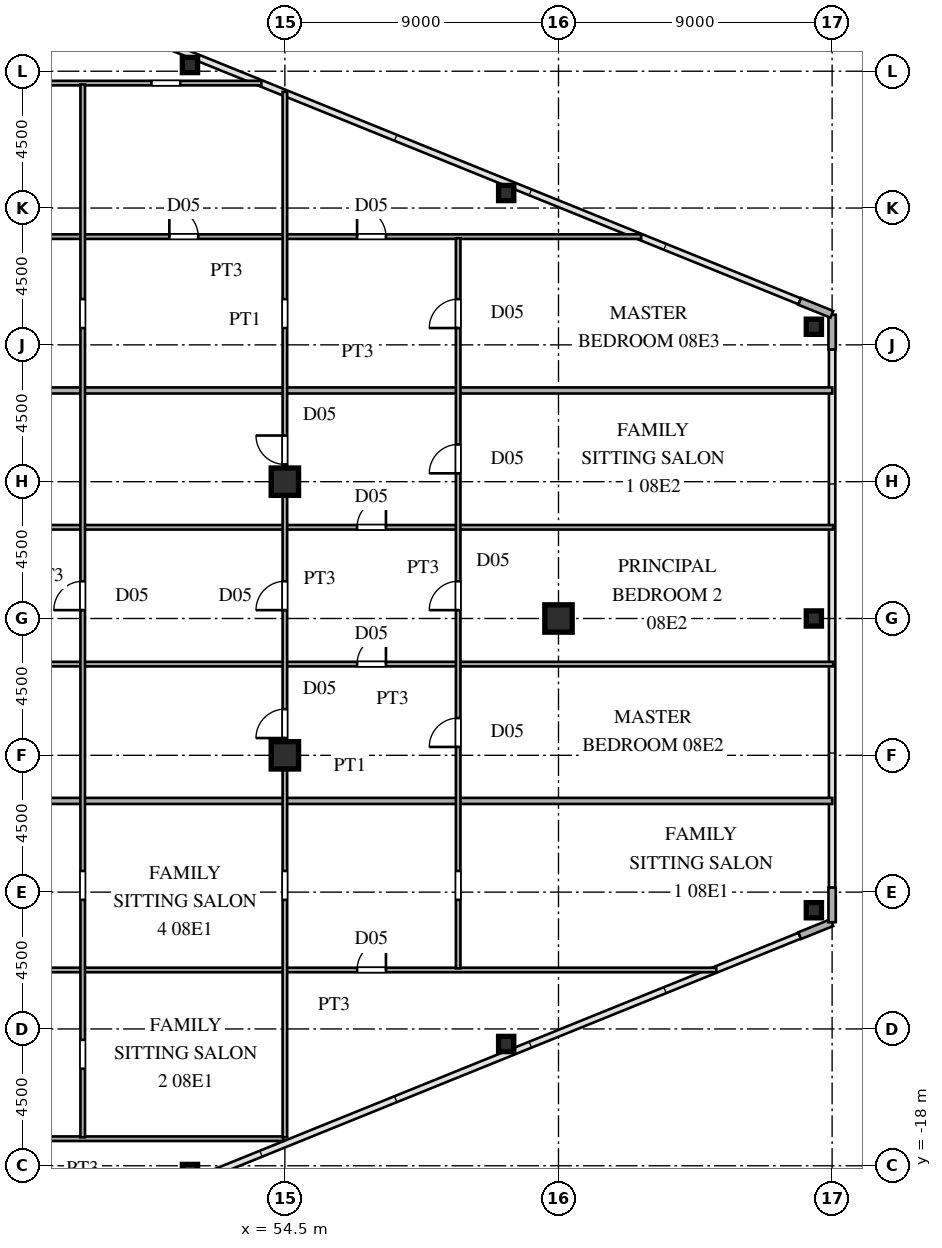
"""IFC4 building model, lengths in metres.
Left out: names, types, materials, properties, quantities, classifications, styles, units other than length and angle.
Written with IfcOpenShell. Run it as: python <this file> out.ifc"""

import sys

from ifc_helpers import new_model, si_unit, direction, frame, frame_2d, origin, origin_2d, place, context, subcontext, project, spatial, rectangle, hollow_rectangle, i_section, extrude, source, transform, mapped, element, fill, save


model = new_model("IFC4")
c1 = context("Model", 3, precision=1e-05, world=origin(), true_north=direction((0.0, 1.0)))
c2 = subcontext(c1, "Body", "Model", "MODEL_VIEW")
j1 = project(units=[si_unit("LENGTHUNIT", "METRE"), si_unit("PLANEANGLEUNIT", "RADIAN")], contexts=[c1])
p1 = place(None, origin())
s1 = spatial("IfcSite", under=j1, at=p1, CompositionType="ELEMENT")
p2 = place(p1, origin())
s2 = spatial("IfcBuilding", under=s1, at=p2, CompositionType="ELEMENT")
p3 = place(p2, frame((0.0, 0.0, 33.3)))
s3 = spatial("IfcBuildingStorey", under=s2, at=p3, CompositionType="ELEMENT", Elevation=33.3)
m1 = source(origin(), c2, "Body", "SweptSolid", [
    extrude(i_section(OverallWidth=0.9, OverallDepth=0.9, WebThickness=0.036, FlangeThickness=0.055, at=origin_2d()), origin(), (0.0, 0.0, 1.0), 3.6),
])
for number, where, z_axis, x_axis in (
    (1, (54.5, -4.5, 0.0), (0.0, 0.0, 1.0), (1.0, 0.0, 0.0)),
    (2, (54.5, 4.5, 0.0), (0.0, 0.0, 1.0), (1.0, 0.0, 0.0)),
    (3, (63.5, 0.0, 0.0), (0.0, 0.0, 1.0), (1.0, 0.0, 0.0)),
):
    element("IfcColumn", number, at=place(p3, frame(where, z_axis=z_axis, x_axis=x_axis)), inside=s3, PredefinedType="COLUMN", context=c2, shape_type="MappedRepresentation", body=[
        mapped(m1, transform((0.0, 0.0, 0.0), scale=1.0)),
    ])
m2 = source(origin(), c2, "Body", "SweptSolid", [
    extrude(hollow_rectangle(XDim=0.5, YDim=0.5, WallThickness=0.02, at=origin_2d()), origin(), (0.0, 0.0, 1.0), 3.6),
])
for number, where, z_axis, x_axis in (
    (4, (71.9, -9.596, 0.0), (0.0, 0.0, 1.0), (1.0, 0.0, 0.0)),
    (5, (71.9, 9.596, 0.0), (0.0, 0.0, 1.0), (1.0, 0.0, 0.0)),
    (6, (51.378, -18.204, 0.0), (0.0, 0.0, 1.0), (1.0, 0.0, 0.0)),
    (7, (61.779, -13.994, 0.0), (0.0, 0.0, 1.0), (1.0, 0.0, 0.0)),
    (8, (51.378, 18.204, 0.0), (0.0, 0.0, 1.0), (1.0, 0.0, 0.0)),
    (9, (61.779, 13.994, 0.0), (0.0, 0.0, 1.0), (1.0, 0.0, 0.0)),
    (10, (71.9, 0.0, 0.0), (0.0, 0.0, 1.0), (1.0, 0.0, 0.0)),
):
    element("IfcColumn", number, at=place(p3, frame(where, z_axis=z_axis, x_axis=x_axis)), inside=s3, PredefinedType="COLUMN", context=c2, shape_type="MappedRepresentation", body=[
        mapped(m2, transform((0.0, 0.0, 0.0), scale=1.0)),
    ])
for number, where, z_axis, x_axis in (
    (11, (71.434, -10.431, 0.0), (0.0, 0.0, 1.0), (0.927, 0.375, 0.0)),
    (12, (72.5, -9.99, 0.0), (0.0, 0.0, 1.0), (0.0, 1.0, 0.0)),
    (13, (72.5, 8.85, 0.0), (0.0, 0.0, 1.0), (0.0, 1.0, 0.0)),
    (14, (72.491, 10.004, 0.0), (0.0, 0.0, 1.0), (-0.927, 0.375, 0.0)),
):
    element("IfcWall", number, at=place(p3, frame(where, z_axis=z_axis, x_axis=x_axis)), inside=s3, PredefinedType="SOLIDWALL", context=c2, shape_type="SweptSolid", body=[
        extrude(rectangle(XDim=1.14, YDim=0.24, at=frame_2d((0.57, 0.0))), origin(), (0.0, 0.0, 1.0), 3.38),
    ])
p4 = place(p3, frame((41.25, -17.11, 0.0), z_axis=(0.0, 0.0, 1.0), x_axis=(1.0, 0.0, 0.0)))
e15 = element("IfcWall", 15, at=p4, inside=s3, PredefinedType="PARTITIONING", context=c2, shape_type="SweptSolid", body=[
    extrude(rectangle(XDim=13.2, YDim=0.15, at=frame_2d((6.6, 0.0))), origin(), (0.0, 0.0, 1.0), 3.38),
])
p5 = place(p4, frame((2.8, 0.0, 0.0)))
e16 = element("IfcOpeningElement", 16, at=p5, cuts=e15, PredefinedType="OPENING", context=c2, shape_type="SweptSolid", body=[
    extrude(rectangle(XDim=0.95, YDim=2.15, at=frame_2d((0.475, 1.075))), frame((0.0, 0.085, 0.0), z_axis=(0.0, -1.0, 0.0), x_axis=(1.0, 0.0, 0.0)), (0.0, 0.0, 1.0), 0.17),
])
p6 = place(p3, frame((41.25, -11.56, 0.0), z_axis=(0.0, 0.0, 1.0), x_axis=(1.0, 0.0, 0.0)))
e17 = element("IfcWall", 17, at=p6, inside=s3, PredefinedType="PARTITIONING", context=c2, shape_type="SweptSolid", body=[
    extrude(rectangle(XDim=27.44, YDim=0.15, at=frame_2d((13.72, 0.0))), origin(), (0.0, 0.0, 1.0), 3.38),
])
p7 = place(p6, frame((2.8, 0.0, 0.0)))
e18 = element("IfcOpeningElement", 18, at=p7, cuts=e17, PredefinedType="OPENING", context=c2, shape_type="SweptSolid", body=[
    extrude(rectangle(XDim=0.95, YDim=2.15, at=frame_2d((0.475, 1.075))), frame((0.0, 0.085, 0.0), z_axis=(0.0, -1.0, 0.0), x_axis=(1.0, 0.0, 0.0)), (0.0, 0.0, 1.0), 0.17),
])
p8 = place(p6, frame((15.625, 0.0, 0.0)))
e19 = element("IfcOpeningElement", 19, at=p8, cuts=e17, PredefinedType="OPENING", context=c2, shape_type="SweptSolid", body=[
    extrude(rectangle(XDim=0.95, YDim=2.15, at=frame_2d((0.475, 1.075))), frame((0.0, 0.085, 0.0), z_axis=(0.0, -1.0, 0.0), x_axis=(1.0, 0.0, 0.0)), (0.0, 0.0, 1.0), 0.17),
])
p9 = place(p3, frame((38.48, -6.0, 0.0), z_axis=(0.0, 0.0, 1.0), x_axis=(1.0, 0.0, 0.0)))
e20 = element("IfcWall", 20, at=p9, inside=s3, PredefinedType="PARTITIONING", context=c2, shape_type="SweptSolid", body=[
    extrude(rectangle(XDim=34.025, YDim=0.2, at=frame_2d((17.012, 0.0))), origin(), (0.0, 0.0, 1.0), 3.38),
])
p10 = place(p3, frame((41.25, -1.5, 0.0), z_axis=(0.0, 0.0, 1.0), x_axis=(1.0, 0.0, 0.0)))
e21 = element("IfcWall", 21, at=p10, inside=s3, PredefinedType="PARTITIONING", context=c2, shape_type="SweptSolid", body=[
    extrude(rectangle(XDim=31.285, YDim=0.15, at=frame_2d((15.643, 0.0))), origin(), (0.0, 0.0, 1.0), 3.38),
])
p11 = place(p10, frame((2.8, 0.0, 0.0)))
e22 = element("IfcOpeningElement", 22, at=p11, cuts=e21, PredefinedType="OPENING", context=c2, shape_type="SweptSolid", body=[
    extrude(rectangle(XDim=0.95, YDim=2.15, at=frame_2d((0.475, 1.075))), frame((0.0, 0.085, 0.0), z_axis=(0.0, -1.0, 0.0), x_axis=(1.0, 0.0, 0.0)), (0.0, 0.0, 1.0), 0.17),
])
p12 = place(p10, frame((15.625, 0.0, 0.0)))
e23 = element("IfcOpeningElement", 23, at=p12, cuts=e21, PredefinedType="OPENING", context=c2, shape_type="SweptSolid", body=[
    extrude(rectangle(XDim=0.95, YDim=2.15, at=frame_2d((0.475, 1.075))), frame((0.0, 0.085, 0.0), z_axis=(0.0, -1.0, 0.0), x_axis=(1.0, 0.0, 0.0)), (0.0, 0.0, 1.0), 0.17),
])
p13 = place(p3, frame((41.25, 3.0, 0.0), z_axis=(0.0, 0.0, 1.0), x_axis=(1.0, 0.0, 0.0)))
e24 = element("IfcWall", 24, at=p13, inside=s3, PredefinedType="PARTITIONING", context=c2, shape_type="SweptSolid", body=[
    extrude(rectangle(XDim=31.285, YDim=0.15, at=frame_2d((15.643, 0.0))), origin(), (0.0, 0.0, 1.0), 3.38),
])
p14 = place(p13, frame((2.8, 0.0, 0.0)))
e25 = element("IfcOpeningElement", 25, at=p14, cuts=e24, PredefinedType="OPENING", context=c2, shape_type="SweptSolid", body=[
    extrude(rectangle(XDim=0.95, YDim=2.15, at=frame_2d((0.475, 1.075))), frame((0.0, 0.085, 0.0), z_axis=(0.0, -1.0, 0.0), x_axis=(1.0, 0.0, 0.0)), (0.0, 0.0, 1.0), 0.17),
])
p15 = place(p13, frame((15.625, 0.0, 0.0)))
e26 = element("IfcOpeningElement", 26, at=p15, cuts=e24, PredefinedType="OPENING", context=c2, shape_type="SweptSolid", body=[
    extrude(rectangle(XDim=0.95, YDim=2.15, at=frame_2d((0.475, 1.075))), frame((0.0, 0.085, 0.0), z_axis=(0.0, -1.0, 0.0), x_axis=(1.0, 0.0, 0.0)), (0.0, 0.0, 1.0), 0.17),
])
p16 = place(p3, frame((38.48, 7.5, 0.0), z_axis=(0.0, 0.0, 1.0), x_axis=(1.0, 0.0, 0.0)))
e27 = element("IfcWall", 27, at=p16, inside=s3, PredefinedType="PARTITIONING", context=c2, shape_type="SweptSolid", body=[
    extrude(rectangle(XDim=34.025, YDim=0.2, at=frame_2d((17.012, 0.0))), origin(), (0.0, 0.0, 1.0), 3.38),
])
p17 = place(p3, frame((41.25, 12.56, 0.0), z_axis=(0.0, 0.0, 1.0), x_axis=(1.0, 0.0, 0.0)))
e28 = element("IfcWall", 28, at=p17, inside=s3, PredefinedType="PARTITIONING", context=c2, shape_type="SweptSolid", body=[
    extrude(rectangle(XDim=24.969, YDim=0.15, at=frame_2d((12.484, 0.0))), origin(), (0.0, 0.0, 1.0), 3.38),
])
p18 = place(p17, frame((2.8, 0.0, 0.0)))
e29 = element("IfcOpeningElement", 29, at=p18, cuts=e28, PredefinedType="OPENING", context=c2, shape_type="SweptSolid", body=[
    extrude(rectangle(XDim=0.95, YDim=2.15, at=frame_2d((0.475, 1.075))), frame((0.0, 0.085, 0.0), z_axis=(0.0, -1.0, 0.0), x_axis=(1.0, 0.0, 0.0)), (0.0, 0.0, 1.0), 0.17),
])
p19 = place(p17, frame((15.625, 0.0, 0.0)))
e30 = element("IfcOpeningElement", 30, at=p19, cuts=e28, PredefinedType="OPENING", context=c2, shape_type="SweptSolid", body=[
    extrude(rectangle(XDim=0.95, YDim=2.15, at=frame_2d((0.475, 1.075))), frame((0.0, 0.085, 0.0), z_axis=(0.0, -1.0, 0.0), x_axis=(1.0, 0.0, 0.0)), (0.0, 0.0, 1.0), 0.17),
])
p20 = place(p17, frame((9.45, 0.0, 0.0)))
e31 = element("IfcOpeningElement", 31, at=p20, cuts=e28, PredefinedType="OPENING", context=c2, shape_type="SweptSolid", body=[
    extrude(rectangle(XDim=0.95, YDim=2.15, at=frame_2d((0.475, 1.075))), frame((0.0, 0.085, 0.0), z_axis=(0.0, -1.0, 0.0), x_axis=(1.0, 0.0, 0.0)), (0.0, 0.0, 1.0), 0.17),
])
p21 = place(p3, frame((41.25, 17.61, 0.0), z_axis=(0.0, 0.0, 1.0), x_axis=(1.0, 0.0, 0.0)))
e32 = element("IfcWall", 32, at=p21, inside=s3, PredefinedType="PARTITIONING", context=c2, shape_type="SweptSolid", body=[
    extrude(rectangle(XDim=12.477, YDim=0.15, at=frame_2d((6.239, 0.0))), origin(), (0.0, 0.0, 1.0), 3.38),
])
p22 = place(p21, frame((8.86, 0.0, 0.0)))
e33 = element("IfcOpeningElement", 33, at=p22, cuts=e32, PredefinedType="OPENING", context=c2, shape_type="SweptSolid", body=[
    extrude(rectangle(XDim=0.95, YDim=2.15, at=frame_2d((0.475, 1.075))), frame((0.0, 0.085, 0.0), z_axis=(0.0, -1.0, 0.0), x_axis=(1.0, 0.0, 0.0)), (0.0, 0.0, 1.0), 0.17),
])
p23 = place(p3, frame((47.85, -17.063, 0.0), z_axis=(0.0, 0.0, 1.0), x_axis=(0.0, 1.0, 0.0)))
e34 = element("IfcWall", 34, at=p23, inside=s3, PredefinedType="PARTITIONING", context=c2, shape_type="SweptSolid", body=[
    extrude(rectangle(XDim=34.626, YDim=0.15, at=frame_2d((17.313, 0.0))), origin(), (0.0, 0.0, 1.0), 3.38),
])
p24 = place(p23, frame((7.81, 0.0, 0.0)))
e35 = element("IfcOpeningElement", 35, at=p24, cuts=e34, PredefinedType="OPENING", context=c2, shape_type="SweptSolid", body=[
    extrude(rectangle(XDim=0.95, YDim=2.15, at=frame_2d((0.475, 1.075))), frame((0.0, 0.085, 0.0), z_axis=(0.0, -1.0, 0.0), x_axis=(1.0, 0.0, 0.0)), (0.0, 0.0, 1.0), 0.17),
])
p25 = place(p23, frame((2.253, 0.0, 0.0)))
e36 = element("IfcOpeningElement", 36, at=p25, cuts=e34, PredefinedType="OPENING", context=c2, shape_type="SweptSolid", body=[
    extrude(rectangle(XDim=0.95, YDim=2.15, at=frame_2d((0.475, 1.075))), frame((0.0, 0.085, 0.0), z_axis=(0.0, -1.0, 0.0), x_axis=(1.0, 0.0, 0.0)), (0.0, 0.0, 1.0), 0.17),
])
p26 = place(p23, frame((17.338, 0.0, 0.0)))
e37 = element("IfcOpeningElement", 37, at=p26, cuts=e34, PredefinedType="OPENING", context=c2, shape_type="SweptSolid", body=[
    extrude(rectangle(XDim=0.95, YDim=2.15, at=frame_2d((0.475, 1.075))), frame((0.0, 0.085, 0.0), z_axis=(0.0, -1.0, 0.0), x_axis=(1.0, 0.0, 0.0)), (0.0, 0.0, 1.0), 0.17),
])
p27 = place(p23, frame((26.616, 0.0, 0.0)))
e38 = element("IfcOpeningElement", 38, at=p27, cuts=e34, PredefinedType="OPENING", context=c2, shape_type="SweptSolid", body=[
    extrude(rectangle(XDim=0.95, YDim=2.15, at=frame_2d((0.475, 1.075))), frame((0.0, 0.085, 0.0), z_axis=(0.0, -1.0, 0.0), x_axis=(1.0, 0.0, 0.0)), (0.0, 0.0, 1.0), 0.17),
])
p28 = place(p3, frame((54.5, -17.063, 0.0), z_axis=(0.0, 0.0, 1.0), x_axis=(0.0, 1.0, 0.0)))
e39 = element("IfcWall", 39, at=p28, inside=s3, PredefinedType="PARTITIONING", context=c2, shape_type="SweptSolid", body=[
    extrude(rectangle(XDim=34.384, YDim=0.15, at=frame_2d((17.192, 0.0))), origin(), (0.0, 0.0, 1.0), 2.68),
])
p29 = place(p28, frame((7.81, 0.0, 0.0)))
e40 = element("IfcOpeningElement", 40, at=p29, cuts=e39, PredefinedType="OPENING", context=c2, shape_type="SweptSolid", body=[
    extrude(rectangle(XDim=0.95, YDim=2.15, at=frame_2d((0.475, 1.075))), frame((0.0, 0.085, 0.0), z_axis=(0.0, -1.0, 0.0), x_axis=(1.0, 0.0, 0.0)), (0.0, 0.0, 1.0), 0.17),
])
p30 = place(p28, frame((17.338, 0.0, 0.0)))
e41 = element("IfcOpeningElement", 41, at=p30, cuts=e39, PredefinedType="OPENING", context=c2, shape_type="SweptSolid", body=[
    extrude(rectangle(XDim=0.95, YDim=2.15, at=frame_2d((0.475, 1.075))), frame((0.0, 0.085, 0.0), z_axis=(0.0, -1.0, 0.0), x_axis=(1.0, 0.0, 0.0)), (0.0, 0.0, 1.0), 0.17),
])
p31 = place(p28, frame((13.131, 0.0, 0.0)))
e42 = element("IfcOpeningElement", 42, at=p31, cuts=e39, PredefinedType="OPENING", context=c2, shape_type="SweptSolid", body=[
    extrude(rectangle(XDim=0.95, YDim=2.15, at=frame_2d((0.475, 1.075))), frame((0.0, 0.085, 0.0), z_axis=(0.0, -1.0, 0.0), x_axis=(1.0, 0.0, 0.0)), (0.0, 0.0, 1.0), 0.17),
])
p32 = place(p28, frame((22.131, 0.0, 0.0)))
e43 = element("IfcOpeningElement", 43, at=p32, cuts=e39, PredefinedType="OPENING", context=c2, shape_type="SweptSolid", body=[
    extrude(rectangle(XDim=0.95, YDim=2.15, at=frame_2d((0.475, 1.075))), frame((0.0, 0.085, 0.0), z_axis=(0.0, -1.0, 0.0), x_axis=(1.0, 0.0, 0.0)), (0.0, 0.0, 1.0), 0.17),
])
p33 = place(p28, frame((26.616, 0.0, 0.0)))
e44 = element("IfcOpeningElement", 44, at=p33, cuts=e39, PredefinedType="OPENING", context=c2, shape_type="SweptSolid", body=[
    extrude(rectangle(XDim=0.95, YDim=2.15, at=frame_2d((0.475, 1.075))), frame((0.0, 0.085, 0.0), z_axis=(0.0, -1.0, 0.0), x_axis=(1.0, 0.0, 0.0)), (0.0, 0.0, 1.0), 0.17),
])
p34 = place(p3, frame((60.2, -11.506, 0.0), z_axis=(0.0, 0.0, 1.0), x_axis=(0.0, 1.0, 0.0)))
e45 = element("IfcWall", 45, at=p34, inside=s3, PredefinedType="PARTITIONING", context=c2, shape_type="SweptSolid", body=[
    extrude(rectangle(XDim=24.012, YDim=0.15, at=frame_2d((12.006, 0.0))), origin(), (0.0, 0.0, 1.0), 3.38),
])
p35 = place(p34, frame((2.253, 0.0, 0.0)))
e46 = element("IfcOpeningElement", 46, at=p35, cuts=e45, PredefinedType="OPENING", context=c2, shape_type="SweptSolid", body=[
    extrude(rectangle(XDim=0.95, YDim=2.15, at=frame_2d((0.475, 1.075))), frame((0.0, 0.085, 0.0), z_axis=(0.0, -1.0, 0.0), x_axis=(1.0, 0.0, 0.0)), (0.0, 0.0, 1.0), 0.17),
])
p36 = place(p34, frame((7.281, 0.0, 0.0)))
e47 = element("IfcOpeningElement", 47, at=p36, cuts=e45, PredefinedType="OPENING", context=c2, shape_type="SweptSolid", body=[
    extrude(rectangle(XDim=0.95, YDim=2.15, at=frame_2d((0.475, 1.075))), frame((0.0, 0.085, 0.0), z_axis=(0.0, -1.0, 0.0), x_axis=(1.0, 0.0, 0.0)), (0.0, 0.0, 1.0), 0.17),
])
p37 = place(p34, frame((11.781, 0.0, 0.0)))
e48 = element("IfcOpeningElement", 48, at=p37, cuts=e45, PredefinedType="OPENING", context=c2, shape_type="SweptSolid", body=[
    extrude(rectangle(XDim=0.95, YDim=2.15, at=frame_2d((0.475, 1.075))), frame((0.0, 0.085, 0.0), z_axis=(0.0, -1.0, 0.0), x_axis=(1.0, 0.0, 0.0)), (0.0, 0.0, 1.0), 0.17),
])
p38 = place(p34, frame((16.281, 0.0, 0.0)))
e49 = element("IfcOpeningElement", 49, at=p38, cuts=e45, PredefinedType="OPENING", context=c2, shape_type="SweptSolid", body=[
    extrude(rectangle(XDim=0.95, YDim=2.15, at=frame_2d((0.475, 1.075))), frame((0.0, 0.085, 0.0), z_axis=(0.0, -1.0, 0.0), x_axis=(1.0, 0.0, 0.0)), (0.0, 0.0, 1.0), 0.17),
])
p39 = place(p34, frame((21.059, 0.0, 0.0)))
e50 = element("IfcOpeningElement", 50, at=p39, cuts=e45, PredefinedType="OPENING", context=c2, shape_type="SweptSolid", body=[
    extrude(rectangle(XDim=0.95, YDim=2.15, at=frame_2d((0.475, 1.075))), frame((0.0, 0.085, 0.0), z_axis=(0.0, -1.0, 0.0), x_axis=(1.0, 0.0, 0.0)), (0.0, 0.0, 1.0), 0.17),
])
m3 = source(origin(), c2, "Body", "SweptSolid", [
    extrude(rectangle(XDim=0.95, YDim=2.15, at=frame_2d((0.475, 1.075))), frame((0.0, 0.025, 0.0), z_axis=(0.0, -1.0, 0.0), x_axis=(1.0, 0.0, 0.0)), (0.0, 0.0, 1.0), 0.05),
])
p40 = place(p8, origin())
e51 = element("IfcDoor", 51, at=p40, inside=s3, OperationType="SINGLE_SWING_RIGHT", PredefinedType="DOOR", context=c2, shape_type="MappedRepresentation", body=[
    mapped(m3, transform((0.0, 0.0, 0.0), scale=1.0)),
])
fill(e19, e51)
p41 = place(p12, origin())
e52 = element("IfcDoor", 52, at=p41, inside=s3, OperationType="SINGLE_SWING_RIGHT", PredefinedType="DOOR", context=c2, shape_type="MappedRepresentation", body=[
    mapped(m3, transform((0.0, 0.0, 0.0), scale=1.0)),
])
fill(e23, e52)
p42 = place(p15, origin())
e53 = element("IfcDoor", 53, at=p42, inside=s3, OperationType="SINGLE_SWING_RIGHT", PredefinedType="DOOR", context=c2, shape_type="MappedRepresentation", body=[
    mapped(m3, transform((0.0, 0.0, 0.0), scale=1.0)),
])
fill(e26, e53)
p43 = place(p19, origin())
e54 = element("IfcDoor", 54, at=p43, inside=s3, OperationType="SINGLE_SWING_LEFT", PredefinedType="DOOR", context=c2, shape_type="MappedRepresentation", body=[
    mapped(m3, transform((0.0, 0.0, 0.0), scale=1.0)),
])
fill(e30, e54)
p44 = place(p20, origin())
e55 = element("IfcDoor", 55, at=p44, inside=s3, OperationType="SINGLE_SWING_LEFT", PredefinedType="DOOR", context=c2, shape_type="MappedRepresentation", body=[
    mapped(m3, transform((0.0, 0.0, 0.0), scale=1.0)),
])
fill(e31, e55)
p45 = place(p26, origin())
e56 = element("IfcDoor", 56, at=p45, inside=s3, OperationType="SINGLE_SWING_LEFT", PredefinedType="DOOR", context=c2, shape_type="MappedRepresentation", body=[
    mapped(m3, transform((0.0, 0.0, 0.0), scale=1.0)),
])
fill(e37, e56)
p46 = place(p30, origin())
e57 = element("IfcDoor", 57, at=p46, inside=s3, OperationType="SINGLE_SWING_LEFT", PredefinedType="DOOR", context=c2, shape_type="MappedRepresentation", body=[
    mapped(m3, transform((0.0, 0.0, 0.0), scale=1.0)),
])
fill(e41, e57)
p47 = place(p31, origin())
e58 = element("IfcDoor", 58, at=p47, inside=s3, OperationType="SINGLE_SWING_LEFT", PredefinedType="DOOR", context=c2, shape_type="MappedRepresentation", body=[
    mapped(m3, transform((0.0, 0.0, 0.0), scale=1.0)),
])
fill(e42, e58)
p48 = place(p32, origin())
e59 = element("IfcDoor", 59, at=p48, inside=s3, OperationType="SINGLE_SWING_RIGHT", PredefinedType="DOOR", context=c2, shape_type="MappedRepresentation", body=[
    mapped(m3, transform((0.0, 0.0, 0.0), scale=1.0)),
])
fill(e43, e59)
p49 = place(p36, origin())
e60 = element("IfcDoor", 60, at=p49, inside=s3, OperationType="SINGLE_SWING_LEFT", PredefinedType="DOOR", context=c2, shape_type="MappedRepresentation", body=[
    mapped(m3, transform((0.0, 0.0, 0.0), scale=1.0)),
])
fill(e47, e60)
p50 = place(p37, origin())
e61 = element("IfcDoor", 61, at=p50, inside=s3, OperationType="SINGLE_SWING_LEFT", PredefinedType="DOOR", context=c2, shape_type="MappedRepresentation", body=[
    mapped(m3, transform((0.0, 0.0, 0.0), scale=1.0)),
])
fill(e48, e61)
p51 = place(p38, origin())
e62 = element("IfcDoor", 62, at=p51, inside=s3, OperationType="SINGLE_SWING_LEFT", PredefinedType="DOOR", context=c2, shape_type="MappedRepresentation", body=[
    mapped(m3, transform((0.0, 0.0, 0.0), scale=1.0)),
])
fill(e49, e62)
p52 = place(p39, origin())
e63 = element("IfcDoor", 63, at=p52, inside=s3, OperationType="SINGLE_SWING_LEFT", PredefinedType="DOOR", context=c2, shape_type="MappedRepresentation", body=[
    mapped(m3, transform((0.0, 0.0, 0.0), scale=1.0)),
])
fill(e50, e63)
save(model, sys.argv[1])
